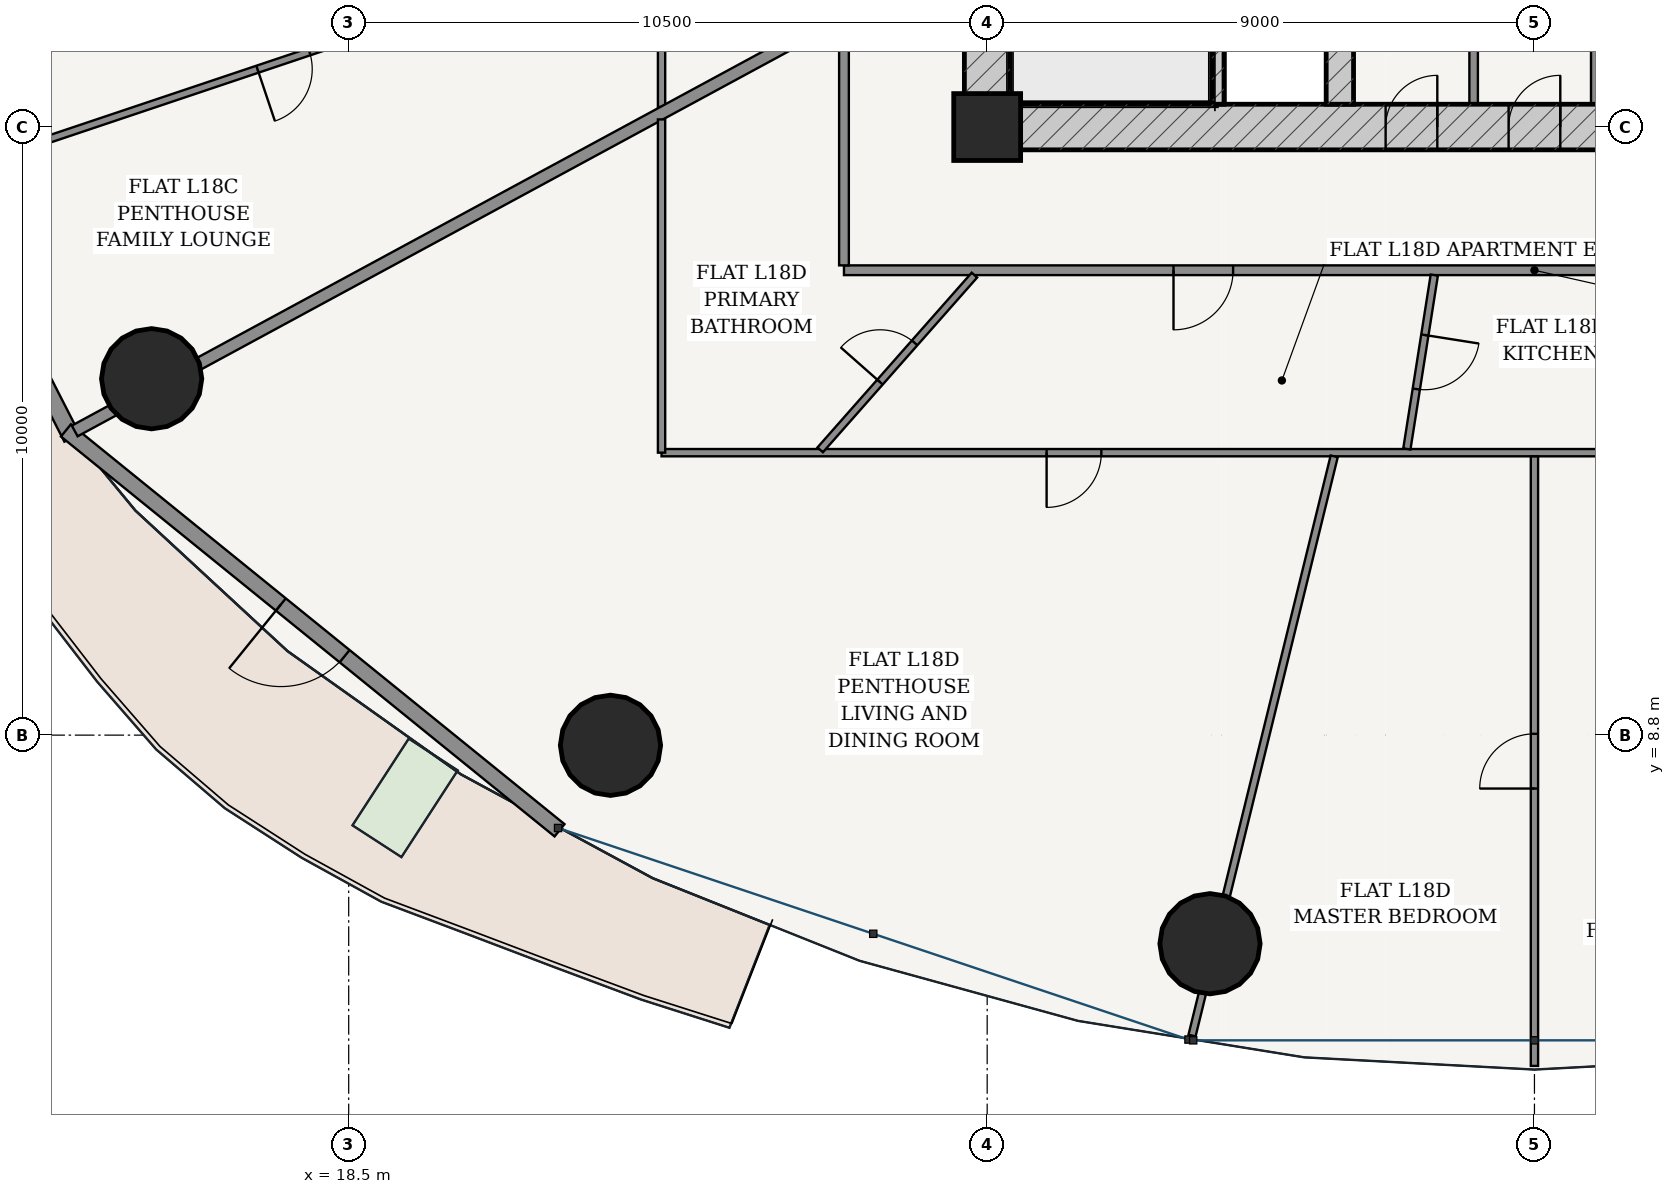
"""IFC4 building model, lengths in metres.
Left out: names, types, materials, properties, quantities, classifications, styles, units other than length and angle.
Written with IfcOpenShell. Run it as: python <this file> out.ifc"""

import sys

from ifc_helpers import new_model, si_unit, direction, frame, frame_2d, origin, origin_2d, place, context, subcontext, project, spatial, rectangle, hollow_circle, extrude, source, transform, mapped, element, fill, save


model = new_model("IFC4")
c1 = context("Model", 3, precision=1e-05, world=origin(), true_north=direction((-0.2419218956, 0.970295726276)))
c2 = subcontext(c1, "Body", "Model", "MODEL_VIEW")
j1 = project(units=[si_unit("LENGTHUNIT", "METRE"), si_unit("PLANEANGLEUNIT", "RADIAN")], contexts=[c1])
p1 = place(None, origin())
s1 = spatial("IfcSite", under=j1, at=p1, CompositionType="ELEMENT")
p2 = place(p1, origin())
s2 = spatial("IfcBuilding", under=s1, at=p2, CompositionType="ELEMENT")
p3 = place(p2, frame((0.0, 0.0, 70.8)))
s3 = spatial("IfcBuildingStorey", under=s2, at=p3, CompositionType="ELEMENT", Elevation=70.8)
p4 = place(p3, frame((29.0, 18.8, 0.0), z_axis=(0.0, 0.0, 1.0), x_axis=(1.0, 0.0, 0.0)))
e1 = element("IfcColumn", 1, at=p4, inside=s3, PredefinedType="COLUMN", context=c2, shape_type="SweptSolid", body=[
    extrude(rectangle(XDim=1.1, YDim=1.1, at=origin_2d()), origin(), (0.0, 0.0, 1.0), 3.6),
])
p5 = place(p3, frame((28.625, 18.8, 0.0), z_axis=(0.0, 0.0, 1.0), x_axis=(1.0, 0.0, 0.0)))
e2 = element("IfcWall", 2, at=p5, inside=s3, PredefinedType="SHEAR", context=c2, shape_type="SweptSolid", body=[
    extrude(rectangle(XDim=18.75, YDim=0.75, at=frame_2d((9.375, 0.0))), origin(), (0.0, 0.0, 1.0), 3.15),
])
p6 = place(p5, frame((6.927, 0.0, 0.0)))
e3 = element("IfcOpeningElement", 3, at=p6, cuts=e2, PredefinedType="OPENING", context=c2, shape_type="SweptSolid", body=[
    extrude(rectangle(XDim=0.85, YDim=2.1, at=frame_2d((0.425, 1.05))), frame((0.0, 0.385, 0.0), z_axis=(0.0, -1.0, 0.0), x_axis=(1.0, 0.0, 0.0)), (0.0, 0.0, 1.0), 0.77),
])
p7 = place(p5, frame((8.95, 0.0, 0.0)))
e4 = element("IfcOpeningElement", 4, at=p7, cuts=e2, PredefinedType="OPENING", context=c2, shape_type="SweptSolid", body=[
    extrude(rectangle(XDim=0.85, YDim=2.1, at=frame_2d((0.425, 1.05))), frame((0.0, 0.385, 0.0), z_axis=(0.0, -1.0, 0.0), x_axis=(1.0, 0.0, 0.0)), (0.0, 0.0, 1.0), 0.77),
])
p8 = place(p5, frame((10.972, 0.0, 0.0)))
e5 = element("IfcOpeningElement", 5, at=p8, cuts=e2, PredefinedType="OPENING", context=c2, shape_type="SweptSolid", body=[
    extrude(rectangle(XDim=0.85, YDim=2.1, at=frame_2d((0.425, 1.05))), frame((0.0, 0.385, 0.0), z_axis=(0.0, -1.0, 0.0), x_axis=(1.0, 0.0, 0.0)), (0.0, 0.0, 1.0), 0.77),
])
p9 = place(p3, frame((29.0, 19.175, 0.0), z_axis=(0.0, 0.0, 1.0), x_axis=(0.0, 1.0, 0.0)))
e6 = element("IfcWall", 6, at=p9, inside=s3, PredefinedType="SHEAR", context=c2, shape_type="SweptSolid", body=[
    extrude(rectangle(XDim=15.25, YDim=0.75, at=frame_2d((7.625, 0.0))), origin(), (0.0, 0.0, 1.0), 3.15),
])
p10 = place(p9, frame((9.875, 0.0, 0.0)))
e7 = element("IfcOpeningElement", 7, at=p10, cuts=e6, PredefinedType="OPENING", context=c2, shape_type="SweptSolid", body=[
    extrude(rectangle(XDim=1.5, YDim=2.2, at=frame_2d((0.75, 1.1))), frame((0.0, 0.385, 0.0), z_axis=(0.0, -1.0, 0.0), x_axis=(1.0, 0.0, 0.0)), (0.0, 0.0, 1.0), 0.77),
])
p11 = place(p3, frame((32.795, 19.175, 0.0), z_axis=(0.0, 0.0, 1.0), x_axis=(0.0, 1.0, 0.0)))
e8 = element("IfcWall", 8, at=p11, inside=s3, PredefinedType="SOLIDWALL", context=c2, shape_type="SweptSolid", body=[
    extrude(rectangle(XDim=7.375, YDim=0.2, at=frame_2d((3.688, 0.0))), origin(), (0.0, 0.0, 1.0), 3.15),
])
p12 = place(p3, frame((34.8, 19.175, 0.0), z_axis=(0.0, 0.0, 1.0), x_axis=(0.0, 1.0, 0.0)))
e9 = element("IfcWall", 9, at=p12, inside=s3, PredefinedType="SHEAR", context=c2, shape_type="SweptSolid", body=[
    extrude(rectangle(XDim=15.25, YDim=0.45, at=frame_2d((7.625, 0.0))), origin(), (0.0, 0.0, 1.0), 3.15),
])
p13 = place(p12, frame((7.8, 0.0, 0.0)))
e10 = element("IfcOpeningElement", 10, at=p13, cuts=e9, PredefinedType="OPENING", context=c2, shape_type="SweptSolid", body=[
    extrude(rectangle(XDim=1.05, YDim=2.15, at=frame_2d((0.525, 1.075))), frame((0.0, 0.235, 0.0), z_axis=(0.0, -1.0, 0.0), x_axis=(1.0, 0.0, 0.0)), (0.0, 0.0, 1.0), 0.47),
])
for number, where, z_axis, x_axis in (
    (11, (15.259, 14.661, 0.0), (0.0, 0.0, 1.0), (1.0, 0.0, 0.0)),
    (12, (22.805, 8.632, 0.0), (0.0, 0.0, 1.0), (1.0, 0.0, 0.0)),
    (13, (32.664, 5.37, 0.0), (0.0, 0.0, 1.0), (1.0, 0.0, 0.0)),
):
    element("IfcColumn", number, at=place(p3, frame(where, z_axis=z_axis, x_axis=x_axis)), inside=s3, PredefinedType="COLUMN", context=c2, shape_type="SweptSolid", body=[
        extrude(hollow_circle(Radius=0.825, WallThickness=0.05, at=origin_2d()), origin(), (0.0, 0.0, 1.0), 3.6),
    ])
p14 = place(p3, frame((9.55, 22.292, 0.0), z_axis=(0.0, 0.0, 1.0), x_axis=(0.455220575541, -0.890378698984, 0.0)))
e14 = element("IfcWall", 14, at=p14, inside=s3, PredefinedType="SOLIDWALL", context=c2, shape_type="SweptSolid", body=[
    extrude(rectangle(XDim=9.662, YDim=0.28, at=frame_2d((4.831, 0.0))), origin(), (0.0, 0.0, 1.0), 3.15),
])
p15 = place(p14, frame((1.559, 0.0, 0.85)))
e15 = element("IfcOpeningElement", 15, at=p15, cuts=e14, PredefinedType="OPENING", context=c2, shape_type="SweptSolid", body=[
    extrude(rectangle(XDim=2.1, YDim=1.95, at=frame_2d((1.05, 0.975))), frame((0.0, 0.15, 0.0), z_axis=(0.0, -1.0, 0.0), x_axis=(1.0, 0.0, 0.0)), (0.0, 0.0, 1.0), 0.3),
])
p16 = place(p14, frame((6.003, 0.0, 0.85)))
e16 = element("IfcOpeningElement", 16, at=p16, cuts=e14, PredefinedType="OPENING", context=c2, shape_type="SweptSolid", body=[
    extrude(rectangle(XDim=2.1, YDim=1.95, at=frame_2d((1.05, 0.975))), frame((0.0, 0.15, 0.0), z_axis=(0.0, -1.0, 0.0), x_axis=(1.0, 0.0, 0.0)), (0.0, 0.0, 1.0), 0.3),
])
p17 = place(p3, frame((13.85, 13.811, 0.0), z_axis=(0.0, 0.0, 1.0), x_axis=(0.777016782851, -0.629479879875, 0.0)))
e17 = element("IfcWall", 17, at=p17, inside=s3, PredefinedType="SOLIDWALL", context=c2, shape_type="SweptSolid", body=[
    extrude(rectangle(XDim=10.447, YDim=0.26, at=frame_2d((5.223, 0.0))), origin(), (0.0, 0.0, 1.0), 3.15),
])
p18 = place(p17, frame((4.548, 0.0, 0.0)))
e18 = element("IfcOpeningElement", 18, at=p18, cuts=e17, PredefinedType="OPENING", context=c2, shape_type="SweptSolid", body=[
    extrude(rectangle(XDim=1.35, YDim=2.2, at=frame_2d((0.675, 1.1))), frame((0.0, 0.14, 0.0), z_axis=(0.0, -1.0, 0.0), x_axis=(1.0, 0.0, 0.0)), (0.0, 0.0, 1.0), 0.28),
])
p19 = place(p3, frame((37.0, 19.175, 0.0), z_axis=(0.0, 0.0, 1.0), x_axis=(0.0, 1.0, 0.0)))
e19 = element("IfcWall", 19, at=p19, inside=s3, PredefinedType="PARTITIONING", context=c2, shape_type="SweptSolid", body=[
    extrude(rectangle(XDim=4.465, YDim=0.14, at=frame_2d((2.232, 0.0))), origin(), (0.0, 0.0, 1.0), 3.15),
])
p20 = place(p19, frame((1.808, 0.0, 0.0)))
e20 = element("IfcOpeningElement", 20, at=p20, cuts=e19, PredefinedType="OPENING", context=c2, shape_type="SweptSolid", body=[
    extrude(rectangle(XDim=0.85, YDim=2.1, at=frame_2d((0.425, 1.05))), frame((0.0, 0.08, 0.0), z_axis=(0.0, -1.0, 0.0), x_axis=(1.0, 0.0, 0.0)), (0.0, 0.0, 1.0), 0.16),
])
p21 = place(p3, frame((39.0, 19.175, 0.0), z_axis=(0.0, 0.0, 1.0), x_axis=(0.0, 1.0, 0.0)))
e21 = element("IfcWall", 21, at=p21, inside=s3, PredefinedType="PARTITIONING", context=c2, shape_type="SweptSolid", body=[
    extrude(rectangle(XDim=4.465, YDim=0.14, at=frame_2d((2.232, 0.0))), origin(), (0.0, 0.0, 1.0), 3.15),
])
p22 = place(p21, frame((1.808, 0.0, 0.0)))
e22 = element("IfcOpeningElement", 22, at=p22, cuts=e21, PredefinedType="OPENING", context=c2, shape_type="SweptSolid", body=[
    extrude(rectangle(XDim=0.85, YDim=2.1, at=frame_2d((0.425, 1.05))), frame((0.0, 0.08, 0.0), z_axis=(0.0, -1.0, 0.0), x_axis=(1.0, 0.0, 0.0)), (0.0, 0.0, 1.0), 0.16),
])
p23 = place(p3, frame((26.645, 16.445, 0.0), z_axis=(0.0, 0.0, 1.0), x_axis=(1.0, 0.0, 0.0)))
e23 = element("IfcWall", 23, at=p23, inside=s3, PredefinedType="PARTITIONING", context=c2, shape_type="SweptSolid", body=[
    extrude(rectangle(XDim=22.71, YDim=0.16, at=frame_2d((11.355, 0.0))), origin(), (0.0, 0.0, 1.0), 2.596),
])
p24 = place(p23, frame((5.419, 0.0, 0.0)))
e24 = element("IfcOpeningElement", 24, at=p24, cuts=e23, PredefinedType="OPENING", context=c2, shape_type="SweptSolid", body=[
    extrude(rectangle(XDim=0.98, YDim=2.2, at=frame_2d((0.49, 1.1))), frame((0.0, 0.09, 0.0), z_axis=(0.0, -1.0, 0.0), x_axis=(1.0, 0.0, 0.0)), (0.0, 0.0, 1.0), 0.18),
])
p25 = place(p3, frame((26.645, 16.525, 0.0), z_axis=(0.0, 0.0, 1.0), x_axis=(0.0, 1.0, 0.0)))
e25 = element("IfcWall", 25, at=p25, inside=s3, PredefinedType="PARTITIONING", context=c2, shape_type="SweptSolid", body=[
    extrude(rectangle(XDim=20.55, YDim=0.16, at=frame_2d((10.275, 0.0))), origin(), (0.0, 0.0, 1.0), 2.596),
])
p26 = place(p25, frame((16.199, 0.0, 0.0)))
e26 = element("IfcOpeningElement", 26, at=p26, cuts=e25, PredefinedType="OPENING", context=c2, shape_type="SweptSolid", body=[
    extrude(rectangle(XDim=0.98, YDim=2.2, at=frame_2d((0.49, 1.1))), frame((0.0, 0.09, 0.0), z_axis=(0.0, -1.0, 0.0), x_axis=(1.0, 0.0, 0.0)), (0.0, 0.0, 1.0), 0.18),
])
p27 = place(p3, frame((23.645, 19.129, 0.0), z_axis=(0.0, 0.0, 1.0), x_axis=(0.0, 1.0, 0.0)))
e27 = element("IfcWall", 27, at=p27, inside=s3, PredefinedType="PARTITIONING", context=c2, shape_type="SweptSolid", body=[
    extrude(rectangle(XDim=19.201, YDim=0.12, at=frame_2d((9.601, 0.0))), origin(), (0.0, 0.0, 1.0), 2.596),
])
p28 = place(p27, frame((15.038, 0.0, 0.0)))
e28 = element("IfcOpeningElement", 28, at=p28, cuts=e27, PredefinedType="OPENING", context=c2, shape_type="SweptSolid", body=[
    extrude(rectangle(XDim=0.9, YDim=2.15, at=frame_2d((0.45, 1.075))), frame((0.0, 0.07, 0.0), z_axis=(0.0, -1.0, 0.0), x_axis=(1.0, 0.0, 0.0)), (0.0, 0.0, 1.0), 0.14),
])
p29 = place(p27, frame((1.136, 0.0, 0.0)))
e29 = element("IfcOpeningElement", 29, at=p29, cuts=e27, PredefinedType="OPENING", context=c2, shape_type="SweptSolid", body=[
    extrude(rectangle(XDim=0.9, YDim=2.15, at=frame_2d((0.45, 1.075))), frame((0.0, 0.07, 0.0), z_axis=(0.0, -1.0, 0.0), x_axis=(1.0, 0.0, 0.0)), (0.0, 0.0, 1.0), 0.14),
])
p30 = place(p3, frame((23.586, 21.962, 0.0), z_axis=(0.0, 0.0, 1.0), x_axis=(-0.948021751459, -0.318205529118, 0.0)))
e30 = element("IfcWall", 30, at=p30, inside=s3, PredefinedType="PARTITIONING", context=c2, shape_type="SweptSolid", body=[
    extrude(rectangle(XDim=12.994, YDim=0.12, at=frame_2d((6.497, 0.0))), origin(), (0.0, 0.0, 1.0), 2.666),
])
p31 = place(p30, frame((6.047, 0.0, 0.0)))
e31 = element("IfcOpeningElement", 31, at=p31, cuts=e30, PredefinedType="OPENING", context=c2, shape_type="SweptSolid", body=[
    extrude(rectangle(XDim=0.9, YDim=2.15, at=frame_2d((0.45, 1.075))), frame((0.0, 0.07, 0.0), z_axis=(0.0, -1.0, 0.0), x_axis=(1.0, 0.0, 0.0)), (0.0, 0.0, 1.0), 0.14),
])
p32 = place(p3, frame((26.565, 20.608, 0.0), z_axis=(0.0, 0.0, 1.0), x_axis=(-0.879369737803, -0.476139542819, 0.0)))
e32 = element("IfcWall", 32, at=p32, inside=s3, PredefinedType="PARTITIONING", context=c2, shape_type="SweptSolid", body=[
    extrude(rectangle(XDim=14.295, YDim=0.2, at=frame_2d((7.147, 0.0))), origin(), (0.0, 0.0, 1.0), 2.5),
])
p33 = place(p3, frame((41.176, 13.445, 0.0), z_axis=(0.0, 0.0, 1.0), x_axis=(-1.0, 0.0, 0.0)))
e33 = element("IfcWall", 33, at=p33, inside=s3, PredefinedType="PARTITIONING", context=c2, shape_type="SweptSolid", body=[
    extrude(rectangle(XDim=17.531, YDim=0.12, at=frame_2d((8.766, 0.0))), origin(), (0.0, 0.0, 1.0), 2.596),
])
p34 = place(p33, frame((10.299, 0.0, 0.0)))
e34 = element("IfcOpeningElement", 34, at=p34, cuts=e33, PredefinedType="OPENING", context=c2, shape_type="SweptSolid", body=[
    extrude(rectangle(XDim=0.9, YDim=2.15, at=frame_2d((0.45, 1.075))), frame((0.0, 0.07, 0.0), z_axis=(0.0, -1.0, 0.0), x_axis=(1.0, 0.0, 0.0)), (0.0, 0.0, 1.0), 0.14),
])
p35 = place(p33, frame((1.258, 0.0, 0.0)))
e35 = element("IfcOpeningElement", 35, at=p35, cuts=e33, PredefinedType="OPENING", context=c2, shape_type="SweptSolid", body=[
    extrude(rectangle(XDim=0.9, YDim=2.15, at=frame_2d((0.45, 1.075))), frame((0.0, 0.07, 0.0), z_axis=(0.0, -1.0, 0.0), x_axis=(1.0, 0.0, 0.0)), (0.0, 0.0, 1.0), 0.14),
])
p36 = place(p3, frame((23.645, 13.445, 0.0), z_axis=(0.0, 0.0, 1.0), x_axis=(0.0, 1.0, 0.0)))
e36 = element("IfcWall", 36, at=p36, inside=s3, PredefinedType="PARTITIONING", context=c2, shape_type="SweptSolid", body=[
    extrude(rectangle(XDim=5.48, YDim=0.12, at=frame_2d((2.74, 0.0))), origin(), (0.0, 0.0, 1.0), 2.596),
])
p37 = place(p3, frame((34.707, 13.385, 0.0), z_axis=(0.0, 0.0, 1.0), x_axis=(-0.238386763388, -0.971170299711, 0.0)))
e37 = element("IfcWall", 37, at=p37, inside=s3, PredefinedType="PARTITIONING", context=c2, shape_type="SweptSolid", body=[
    extrude(rectangle(XDim=9.808, YDim=0.12, at=frame_2d((4.904, 0.0))), origin(), (0.0, 0.0, 1.0), 2.5),
])
p38 = place(p3, frame((38.0, 13.383, 0.0), z_axis=(0.0, 0.0, 1.0), x_axis=(0.0, -1.0, 0.0)))
e38 = element("IfcWall", 38, at=p38, inside=s3, PredefinedType="PARTITIONING", context=c2, shape_type="SweptSolid", body=[
    extrude(rectangle(XDim=10.023, YDim=0.12, at=frame_2d((5.011, 0.0))), origin(), (0.0, 0.0, 1.0), 2.666),
])
p39 = place(p38, frame((4.562, 0.0, 0.0)))
e39 = element("IfcOpeningElement", 39, at=p39, cuts=e38, PredefinedType="OPENING", context=c2, shape_type="SweptSolid", body=[
    extrude(rectangle(XDim=0.9, YDim=2.15, at=frame_2d((0.45, 1.075))), frame((0.0, 0.07, 0.0), z_axis=(0.0, -1.0, 0.0), x_axis=(1.0, 0.0, 0.0)), (0.0, 0.0, 1.0), 0.14),
])
p40 = place(p3, frame((28.79, 16.365, 0.0), z_axis=(0.0, 0.0, 1.0), x_axis=(-0.661718545222, -0.749752337048, 0.0)))
e40 = element("IfcWall", 40, at=p40, inside=s3, PredefinedType="PARTITIONING", context=c2, shape_type="SweptSolid", body=[
    extrude(rectangle(XDim=3.833, YDim=0.12, at=frame_2d((1.917, 0.0))), origin(), (0.0, 0.0, 1.0), 2.596),
])
p41 = place(p40, frame((1.486, 0.0, 0.0)))
e41 = element("IfcOpeningElement", 41, at=p41, cuts=e40, PredefinedType="OPENING", context=c2, shape_type="SweptSolid", body=[
    extrude(rectangle(XDim=0.86, YDim=2.15, at=frame_2d((0.43, 1.075))), frame((0.0, 0.07, 0.0), z_axis=(0.0, -1.0, 0.0), x_axis=(1.0, 0.0, 0.0)), (0.0, 0.0, 1.0), 0.14),
])
p42 = place(p3, frame((36.353, 16.365, 0.0), z_axis=(0.0, 0.0, 1.0), x_axis=(-0.155897593005, -0.987773223212, 0.0)))
e42 = element("IfcWall", 42, at=p42, inside=s3, PredefinedType="PARTITIONING", context=c2, shape_type="SweptSolid", body=[
    extrude(rectangle(XDim=2.894, YDim=0.12, at=frame_2d((1.447, 0.0))), origin(), (0.0, 0.0, 1.0), 3.15),
])
p43 = place(p42, frame((0.997, 0.0, 0.0)))
e43 = element("IfcOpeningElement", 43, at=p43, cuts=e42, PredefinedType="OPENING", context=c2, shape_type="SweptSolid", body=[
    extrude(rectangle(XDim=0.9, YDim=2.15, at=frame_2d((0.45, 1.075))), frame((0.0, 0.07, 0.0), z_axis=(0.0, -1.0, 0.0), x_axis=(1.0, 0.0, 0.0)), (0.0, 0.0, 1.0), 0.14),
])
m1 = source(origin(), c2, "Body", "SweptSolid", [
    extrude(rectangle(XDim=1.35, YDim=2.2, at=frame_2d((0.675, 1.1))), frame((0.0, 0.025, 0.0), z_axis=(0.0, -1.0, 0.0), x_axis=(1.0, 0.0, 0.0)), (0.0, 0.0, 1.0), 0.05),
])
p44 = place(p18, frame((1.35, 0.0, 0.0), z_axis=(0.0, 0.0, 1.0), x_axis=(-1.0, 0.0, 0.0)))
e44 = element("IfcDoor", 44, at=p44, inside=s3, OperationType="SINGLE_SWING_RIGHT", PredefinedType="DOOR", context=c2, shape_type="MappedRepresentation", body=[
    mapped(m1, transform((0.0, 0.0, 0.0), scale=1.0)),
])
fill(e18, e44)
m2 = source(origin(), c2, "Body", "SweptSolid", [
    extrude(rectangle(XDim=0.85, YDim=2.1, at=frame_2d((0.425, 1.05))), frame((0.0, 0.025, 0.0), z_axis=(0.0, -1.0, 0.0), x_axis=(1.0, 0.0, 0.0)), (0.0, 0.0, 1.0), 0.05),
])
p45 = place(p6, origin())
e45 = element("IfcDoor", 45, at=p45, inside=s3, OperationType="SINGLE_SWING_RIGHT", PredefinedType="DOOR", context=c2, shape_type="MappedRepresentation", body=[
    mapped(m2, transform((0.0, 0.0, 0.0), scale=1.0)),
])
fill(e3, e45)
p46 = place(p7, origin())
e46 = element("IfcDoor", 46, at=p46, inside=s3, OperationType="SINGLE_SWING_RIGHT", PredefinedType="DOOR", context=c2, shape_type="MappedRepresentation", body=[
    mapped(m2, transform((0.0, 0.0, 0.0), scale=1.0)),
])
fill(e4, e46)
m3 = source(origin(), c2, "Body", "SweptSolid", [
    extrude(rectangle(XDim=0.9, YDim=2.15, at=frame_2d((0.45, 1.075))), frame((0.0, 0.025, 0.0), z_axis=(0.0, -1.0, 0.0), x_axis=(1.0, 0.0, 0.0)), (0.0, 0.0, 1.0), 0.05),
])
p47 = place(p31, origin())
e47 = element("IfcDoor", 47, at=p47, inside=s3, OperationType="SINGLE_SWING_RIGHT", PredefinedType="DOOR", context=c2, shape_type="MappedRepresentation", body=[
    mapped(m3, transform((0.0, 0.0, 0.0), scale=1.0)),
])
fill(e31, e47)
m4 = source(origin(), c2, "Body", "SweptSolid", [
    extrude(rectangle(XDim=0.98, YDim=2.2, at=frame_2d((0.49, 1.1))), frame((0.0, 0.025, 0.0), z_axis=(0.0, -1.0, 0.0), x_axis=(1.0, 0.0, 0.0)), (0.0, 0.0, 1.0), 0.05),
])
p48 = place(p24, frame((0.98, 0.0, 0.0), z_axis=(0.0, 0.0, 1.0), x_axis=(-1.0, 0.0, 0.0)))
e48 = element("IfcDoor", 48, at=p48, inside=s3, OperationType="SINGLE_SWING_RIGHT", PredefinedType="DOOR", context=c2, shape_type="MappedRepresentation", body=[
    mapped(m4, transform((0.0, 0.0, 0.0), scale=1.0)),
])
fill(e24, e48)
m5 = source(origin(), c2, "Body", "SweptSolid", [
    extrude(rectangle(XDim=0.86, YDim=2.15, at=frame_2d((0.43, 1.075))), frame((0.0, 0.025, 0.0), z_axis=(0.0, -1.0, 0.0), x_axis=(1.0, 0.0, 0.0)), (0.0, 0.0, 1.0), 0.05),
])
p49 = place(p41, frame((0.86, 0.0, 0.0), z_axis=(0.0, 0.0, 1.0), x_axis=(-1.0, 0.0, 0.0)))
e49 = element("IfcDoor", 49, at=p49, inside=s3, OperationType="SINGLE_SWING_LEFT", PredefinedType="DOOR", context=c2, shape_type="MappedRepresentation", body=[
    mapped(m5, transform((0.0, 0.0, 0.0), scale=1.0)),
])
fill(e41, e49)
p50 = place(p34, origin())
e50 = element("IfcDoor", 50, at=p50, inside=s3, OperationType="SINGLE_SWING_RIGHT", PredefinedType="DOOR", context=c2, shape_type="MappedRepresentation", body=[
    mapped(m3, transform((0.0, 0.0, 0.0), scale=1.0)),
])
fill(e34, e50)
p51 = place(p43, origin())
e51 = element("IfcDoor", 51, at=p51, inside=s3, OperationType="SINGLE_SWING_LEFT", PredefinedType="DOOR", context=c2, shape_type="MappedRepresentation", body=[
    mapped(m3, transform((0.0, 0.0, 0.0), scale=1.0)),
])
fill(e43, e51)
p52 = place(p39, frame((0.9, 0.0, 0.0), z_axis=(0.0, 0.0, 1.0), x_axis=(-1.0, 0.0, 0.0)))
e52 = element("IfcDoor", 52, at=p52, inside=s3, OperationType="SINGLE_SWING_LEFT", PredefinedType="DOOR", context=c2, shape_type="MappedRepresentation", body=[
    mapped(m3, transform((0.0, 0.0, 0.0), scale=1.0)),
])
fill(e39, e52)
save(model, sys.argv[1])
